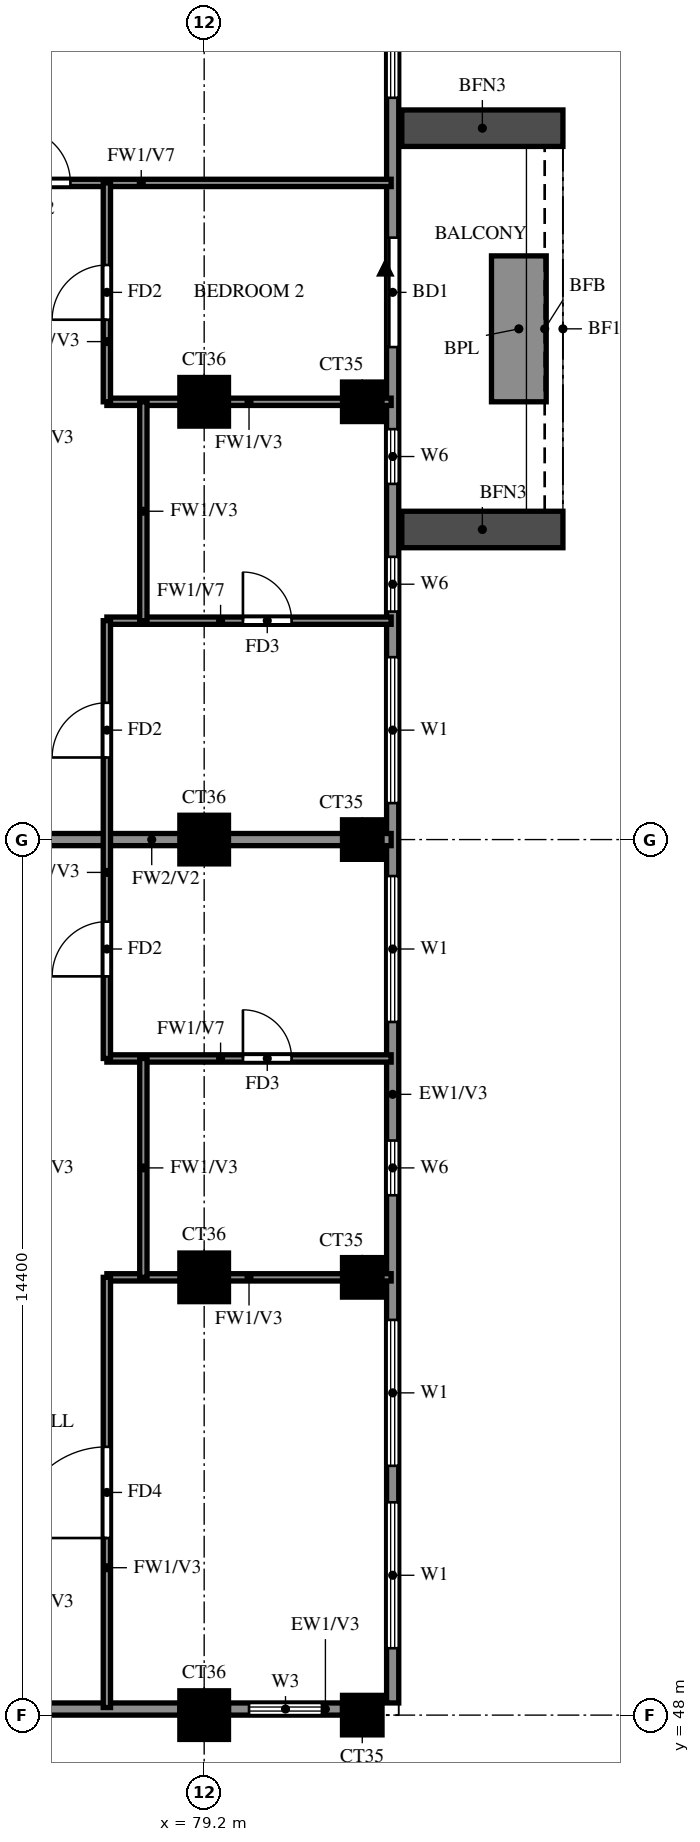
"""IFC4 building model, lengths in metres.
Left out: names, types, materials, properties, quantities, classifications, styles, units other than length and angle.
Written with IfcOpenShell. Run it as: python <this file> out.ifc"""

import sys

from ifc_helpers import new_model, si_unit, direction, frame, frame_2d, origin, origin_2d, place, context, subcontext, project, spatial, rectangle, extrude, source, transform, mapped, element, fill, save


model = new_model("IFC4")
c1 = context("Model", 3, precision=1e-05, world=origin(), true_north=direction((0.0, 1.0)))
c2 = subcontext(c1, "Body", "Model", "MODEL_VIEW")
j1 = project(units=[si_unit("LENGTHUNIT", "METRE"), si_unit("PLANEANGLEUNIT", "RADIAN")], contexts=[c1])
p1 = place(None, origin())
s1 = spatial("IfcSite", under=j1, at=p1, CompositionType="ELEMENT")
p2 = place(p1, origin())
s2 = spatial("IfcBuilding", under=s1, at=p2, CompositionType="ELEMENT")
p3 = place(p2, frame((0.0, 0.0, 236.0)))
s3 = spatial("IfcBuildingStorey", under=s2, at=p3, CompositionType="ELEMENT", Elevation=236.0)
m1 = source(origin(), c2, "Body", "SweptSolid", [
    extrude(rectangle(XDim=0.8, YDim=0.8, at=origin_2d()), origin(), (0.0, 0.0, 1.0), 3.22),
])
p4 = place(p3, frame((79.2, 48.0, 0.0), z_axis=(0.0, 0.0, 1.0), x_axis=(1.0, 0.0, 0.0)))
e1 = element("IfcColumn", 1, at=p4, inside=s3, PredefinedType="COLUMN", context=c2, shape_type="MappedRepresentation", body=[
    mapped(m1, transform((0.0, 0.0, 0.0))),
])
m2 = source(origin(), c2, "Body", "SweptSolid", [
    extrude(rectangle(XDim=0.65, YDim=0.65, at=origin_2d()), origin(), (0.0, 0.0, 1.0), 3.22),
])
p5 = place(p3, frame((81.8, 48.0, 0.0), z_axis=(0.0, 0.0, 1.0), x_axis=(1.0, 0.0, 0.0)))
e2 = element("IfcColumn", 2, at=p5, inside=s3, PredefinedType="COLUMN", context=c2, shape_type="MappedRepresentation", body=[
    mapped(m2, transform((0.0, 0.0, 0.0))),
])
p6 = place(p3, frame((79.2, 55.2, 0.0), z_axis=(0.0, 0.0, 1.0), x_axis=(1.0, 0.0, 0.0)))
e3 = element("IfcColumn", 3, at=p6, inside=s3, PredefinedType="COLUMN", context=c2, shape_type="MappedRepresentation", body=[
    mapped(m1, transform((0.0, 0.0, 0.0))),
])
p7 = place(p3, frame((81.8, 55.2, 0.0), z_axis=(0.0, 0.0, 1.0), x_axis=(1.0, 0.0, 0.0)))
e4 = element("IfcColumn", 4, at=p7, inside=s3, PredefinedType="COLUMN", context=c2, shape_type="MappedRepresentation", body=[
    mapped(m2, transform((0.0, 0.0, 0.0))),
])
p8 = place(p3, frame((79.2, 62.4, 0.0), z_axis=(0.0, 0.0, 1.0), x_axis=(1.0, 0.0, 0.0)))
e5 = element("IfcColumn", 5, at=p8, inside=s3, PredefinedType="COLUMN", context=c2, shape_type="MappedRepresentation", body=[
    mapped(m1, transform((0.0, 0.0, 0.0))),
])
p9 = place(p3, frame((81.8, 62.4, 0.0), z_axis=(0.0, 0.0, 1.0), x_axis=(1.0, 0.0, 0.0)))
e6 = element("IfcColumn", 6, at=p9, inside=s3, PredefinedType="COLUMN", context=c2, shape_type="MappedRepresentation", body=[
    mapped(m2, transform((0.0, 0.0, 0.0))),
])
p10 = place(p3, frame((79.2, 69.6, 0.0), z_axis=(0.0, 0.0, 1.0), x_axis=(1.0, 0.0, 0.0)))
e7 = element("IfcColumn", 7, at=p10, inside=s3, PredefinedType="COLUMN", context=c2, shape_type="MappedRepresentation", body=[
    mapped(m1, transform((0.0, 0.0, 0.0))),
])
p11 = place(p3, frame((81.8, 69.6, 0.0), z_axis=(0.0, 0.0, 1.0), x_axis=(1.0, 0.0, 0.0)))
e8 = element("IfcColumn", 8, at=p11, inside=s3, PredefinedType="COLUMN", context=c2, shape_type="MappedRepresentation", body=[
    mapped(m2, transform((0.0, 0.0, 0.0))),
])
p12 = place(p3, frame((81.907, 39.87, 0.0), z_axis=(0.0, 0.0, 1.0), x_axis=(-0.777936274417, 0.62834318087, 0.0)))
e9 = element("IfcWall", 9, at=p12, inside=s3, PredefinedType="SOLIDWALL", context=c2, shape_type="SweptSolid", body=[
    extrude(rectangle(XDim=13.099, YDim=0.2, at=frame_2d((6.549, 0.0))), origin(), (0.0, 0.0, 1.0), 3.22),
])
p13 = place(p12, frame((9.938, 0.0, 1.5)))
e10 = element("IfcOpeningElement", 10, at=p13, cuts=e9, PredefinedType="OPENING", context=c2, shape_type="SweptSolid", body=[
    extrude(rectangle(XDim=0.9, YDim=0.9, at=frame_2d((0.45, 0.45))), frame((0.0, 0.11, 0.0), z_axis=(0.0, -1.0, 0.0), x_axis=(1.0, 0.0, 0.0)), (0.0, 0.0, 1.0), 0.22),
])
p14 = place(p3, frame((71.987, 48.1, 0.0), z_axis=(0.0, 0.0, 1.0), x_axis=(1.0, 0.0, 0.0)))
e11 = element("IfcWall", 11, at=p14, inside=s3, PredefinedType="SOLIDWALL", context=c2, shape_type="SweptSolid", body=[
    extrude(rectangle(XDim=6.813, YDim=0.2, at=frame_2d((3.406, 0.0))), origin(), (0.0, 0.0, 1.0), 3.22),
])
p15 = place(p3, frame((79.6, 48.1, 0.0), z_axis=(0.0, 0.0, 1.0), x_axis=(1.0, 0.0, 0.0)))
e12 = element("IfcWall", 12, at=p15, inside=s3, PredefinedType="SOLIDWALL", context=c2, shape_type="SweptSolid", body=[
    extrude(rectangle(XDim=1.875, YDim=0.2, at=frame_2d((0.938, 0.0))), origin(), (0.0, 0.0, 1.0), 3.22),
])
p16 = place(p15, frame((0.337, 0.0, 0.6)))
e13 = element("IfcOpeningElement", 13, at=p16, cuts=e12, PredefinedType="OPENING", context=c2, shape_type="SweptSolid", body=[
    extrude(rectangle(XDim=1.2, YDim=2.4, at=frame_2d((0.6, 1.2))), frame((0.0, 0.11, 0.0), z_axis=(0.0, -1.0, 0.0), x_axis=(1.0, 0.0, 0.0)), (0.0, 0.0, 1.0), 0.22),
])
p17 = place(p3, frame((82.3, 48.2, 0.0), z_axis=(0.0, 0.0, 1.0), x_axis=(0.0, 1.0, 0.0)))
e14 = element("IfcWall", 14, at=p17, inside=s3, PredefinedType="SOLIDWALL", context=c2, shape_type="SweptSolid", body=[
    extrude(rectangle(XDim=28.6, YDim=0.2, at=frame_2d((14.3, 0.0))), origin(), (0.0, 0.0, 1.0), 3.22),
])
p18 = place(p17, frame((22.3, 0.0, 0.0)))
e15 = element("IfcOpeningElement", 15, at=p18, cuts=e14, PredefinedType="OPENING", context=c2, shape_type="SweptSolid", body=[
    extrude(rectangle(XDim=1.8, YDim=2.4, at=frame_2d((0.9, 1.2))), frame((0.0, 0.11, 0.0), z_axis=(0.0, -1.0, 0.0), x_axis=(1.0, 0.0, 0.0)), (0.0, 0.0, 1.0), 0.22),
])
p19 = place(p17, frame((0.9, 0.0, 0.6)))
e16 = element("IfcOpeningElement", 16, at=p19, cuts=e14, PredefinedType="OPENING", context=c2, shape_type="SweptSolid", body=[
    extrude(rectangle(XDim=2.4, YDim=2.4, at=frame_2d((1.2, 1.2))), frame((0.0, 0.11, 0.0), z_axis=(0.0, -1.0, 0.0), x_axis=(1.0, 0.0, 0.0)), (0.0, 0.0, 1.0), 0.22),
])
p20 = place(p17, frame((3.9, 0.0, 0.6)))
e17 = element("IfcOpeningElement", 17, at=p20, cuts=e14, PredefinedType="OPENING", context=c2, shape_type="SweptSolid", body=[
    extrude(rectangle(XDim=2.4, YDim=2.4, at=frame_2d((1.2, 1.2))), frame((0.0, 0.11, 0.0), z_axis=(0.0, -1.0, 0.0), x_axis=(1.0, 0.0, 0.0)), (0.0, 0.0, 1.0), 0.22),
])
p21 = place(p17, frame((11.2, 0.0, 0.6)))
e18 = element("IfcOpeningElement", 18, at=p21, cuts=e14, PredefinedType="OPENING", context=c2, shape_type="SweptSolid", body=[
    extrude(rectangle(XDim=2.4, YDim=2.4, at=frame_2d((1.2, 1.2))), frame((0.0, 0.11, 0.0), z_axis=(0.0, -1.0, 0.0), x_axis=(1.0, 0.0, 0.0)), (0.0, 0.0, 1.0), 0.22),
])
p22 = place(p17, frame((8.35, 0.0, 1.5)))
e19 = element("IfcOpeningElement", 19, at=p22, cuts=e14, PredefinedType="OPENING", context=c2, shape_type="SweptSolid", body=[
    extrude(rectangle(XDim=0.9, YDim=0.9, at=frame_2d((0.45, 0.45))), frame((0.0, 0.11, 0.0), z_axis=(0.0, -1.0, 0.0), x_axis=(1.0, 0.0, 0.0)), (0.0, 0.0, 1.0), 0.22),
])
p23 = place(p17, frame((14.8, 0.0, 0.6)))
e20 = element("IfcOpeningElement", 20, at=p23, cuts=e14, PredefinedType="OPENING", context=c2, shape_type="SweptSolid", body=[
    extrude(rectangle(XDim=2.4, YDim=2.4, at=frame_2d((1.2, 1.2))), frame((0.0, 0.11, 0.0), z_axis=(0.0, -1.0, 0.0), x_axis=(1.0, 0.0, 0.0)), (0.0, 0.0, 1.0), 0.22),
])
p24 = place(p17, frame((17.95, 0.0, 1.5)))
e21 = element("IfcOpeningElement", 21, at=p24, cuts=e14, PredefinedType="OPENING", context=c2, shape_type="SweptSolid", body=[
    extrude(rectangle(XDim=0.9, YDim=0.9, at=frame_2d((0.45, 0.45))), frame((0.0, 0.11, 0.0), z_axis=(0.0, -1.0, 0.0), x_axis=(1.0, 0.0, 0.0)), (0.0, 0.0, 1.0), 0.22),
])
p25 = place(p17, frame((20.05, 0.0, 1.5)))
e22 = element("IfcOpeningElement", 22, at=p25, cuts=e14, PredefinedType="OPENING", context=c2, shape_type="SweptSolid", body=[
    extrude(rectangle(XDim=0.9, YDim=0.9, at=frame_2d((0.45, 0.45))), frame((0.0, 0.11, 0.0), z_axis=(0.0, -1.0, 0.0), x_axis=(1.0, 0.0, 0.0)), (0.0, 0.0, 1.0), 0.22),
])
p26 = place(p17, frame((26.4, 0.0, 0.6)))
e23 = element("IfcOpeningElement", 23, at=p26, cuts=e14, PredefinedType="OPENING", context=c2, shape_type="SweptSolid", body=[
    extrude(rectangle(XDim=1.8, YDim=2.4, at=frame_2d((0.9, 1.2))), frame((0.0, 0.11, 0.0), z_axis=(0.0, -1.0, 0.0), x_axis=(1.0, 0.0, 0.0)), (0.0, 0.0, 1.0), 0.22),
])
for number, where, z_axis, x_axis in (
    (24, (82.45, 67.5, 0.0), (0.0, 0.0, 1.0), (1.0, 0.0, 0.0)),
    (25, (82.45, 74.1, 0.0), (0.0, 0.0, 1.0), (1.0, 0.0, 0.0)),
):
    element("IfcWall", number, at=place(p3, frame(where, z_axis=z_axis, x_axis=x_axis)), inside=s3, PredefinedType="SOLIDWALL", context=c2, shape_type="SweptSolid", body=[
        extrude(rectangle(XDim=2.65, YDim=0.6, at=frame_2d((1.325, 0.0))), origin(), (0.0, 0.0, 1.0), 2.85),
    ])
p27 = place(p3, frame((84.375, 69.6, 0.0), z_axis=(0.0, 0.0, 1.0), x_axis=(0.0, 1.0, 0.0)))
e26 = element("IfcWall", 26, at=p27, inside=s3, PredefinedType="SOLIDWALL", context=c2, shape_type="SweptSolid", body=[
    extrude(rectangle(XDim=2.4, YDim=0.9, at=frame_2d((1.2, 0.0))), origin(), (0.0, 0.0, 1.0), 0.9),
])
p28 = place(p3, frame((74.4, 62.4, 0.0), z_axis=(0.0, 0.0, 1.0), x_axis=(1.0, 0.0, 0.0)))
e27 = element("IfcWall", 27, at=p28, inside=s3, PredefinedType="SOLIDWALL", context=c2, shape_type="SweptSolid", body=[
    extrude(rectangle(XDim=7.875, YDim=0.2, at=frame_2d((3.938, 0.0))), origin(), (0.0, 0.0, 1.0), 3.22),
])
p29 = place(p3, frame((77.6, 55.2, 0.0), z_axis=(0.0, 0.0, 1.0), x_axis=(1.0, 0.0, 0.0)))
e28 = element("IfcWall", 28, at=p29, inside=s3, PredefinedType="PARTITIONING", context=c2, shape_type="SweptSolid", body=[
    extrude(rectangle(XDim=4.675, YDim=0.12, at=frame_2d((2.337, 0.0))), origin(), (0.0, 0.0, 1.0), 3.22),
])
p30 = place(p3, frame((77.6, 58.8, 0.0), z_axis=(0.0, 0.0, 1.0), x_axis=(1.0, 0.0, 0.0)))
e29 = element("IfcWall", 29, at=p30, inside=s3, PredefinedType="PARTITIONING", context=c2, shape_type="SweptSolid", body=[
    extrude(rectangle(XDim=4.675, YDim=0.12, at=frame_2d((2.337, 0.0))), origin(), (0.0, 0.0, 1.0), 2.32),
])
p31 = place(p30, frame((2.238, 0.0, 0.0)))
e30 = element("IfcOpeningElement", 30, at=p31, cuts=e29, PredefinedType="OPENING", context=c2, shape_type="SweptSolid", body=[
    extrude(rectangle(XDim=0.8, YDim=2.1, at=frame_2d((0.4, 1.05))), frame((0.0, 0.07, 0.0), z_axis=(0.0, -1.0, 0.0), x_axis=(1.0, 0.0, 0.0)), (0.0, 0.0, 1.0), 0.14),
])
p32 = place(p3, frame((77.6, 66.0, 0.0), z_axis=(0.0, 0.0, 1.0), x_axis=(1.0, 0.0, 0.0)))
e31 = element("IfcWall", 31, at=p32, inside=s3, PredefinedType="PARTITIONING", context=c2, shape_type="SweptSolid", body=[
    extrude(rectangle(XDim=4.675, YDim=0.12, at=frame_2d((2.337, 0.0))), origin(), (0.0, 0.0, 1.0), 2.32),
])
p33 = place(p32, frame((2.238, 0.0, 0.0)))
e32 = element("IfcOpeningElement", 32, at=p33, cuts=e31, PredefinedType="OPENING", context=c2, shape_type="SweptSolid", body=[
    extrude(rectangle(XDim=0.8, YDim=2.1, at=frame_2d((0.4, 1.05))), frame((0.0, 0.07, 0.0), z_axis=(0.0, -1.0, 0.0), x_axis=(1.0, 0.0, 0.0)), (0.0, 0.0, 1.0), 0.14),
])
p34 = place(p3, frame((77.6, 69.6, 0.0), z_axis=(0.0, 0.0, 1.0), x_axis=(1.0, 0.0, 0.0)))
e33 = element("IfcWall", 33, at=p34, inside=s3, PredefinedType="PARTITIONING", context=c2, shape_type="SweptSolid", body=[
    extrude(rectangle(XDim=4.675, YDim=0.12, at=frame_2d((2.337, 0.0))), origin(), (0.0, 0.0, 1.0), 3.22),
])
p35 = place(p3, frame((72.0, 73.2, 0.0), z_axis=(0.0, 0.0, 1.0), x_axis=(1.0, 0.0, 0.0)))
e34 = element("IfcWall", 34, at=p35, inside=s3, PredefinedType="PARTITIONING", context=c2, shape_type="SweptSolid", body=[
    extrude(rectangle(XDim=10.275, YDim=0.12, at=frame_2d((5.137, 0.0))), origin(), (0.0, 0.0, 1.0), 2.32),
])
p36 = place(p35, frame((4.1, 0.0, 0.0)))
e35 = element("IfcOpeningElement", 35, at=p36, cuts=e34, PredefinedType="OPENING", context=c2, shape_type="SweptSolid", body=[
    extrude(rectangle(XDim=0.9, YDim=2.1, at=frame_2d((0.45, 1.05))), frame((0.0, 0.07, 0.0), z_axis=(0.0, -1.0, 0.0), x_axis=(1.0, 0.0, 0.0)), (0.0, 0.0, 1.0), 0.14),
])
p37 = place(p3, frame((77.6, 48.125, 0.0), z_axis=(0.0, 0.0, 1.0), x_axis=(0.0, 1.0, 0.0)))
e36 = element("IfcWall", 36, at=p37, inside=s3, PredefinedType="PARTITIONING", context=c2, shape_type="SweptSolid", body=[
    extrude(rectangle(XDim=7.075, YDim=0.12, at=frame_2d((3.538, 0.0))), origin(), (0.0, 0.0, 1.0), 3.22),
])
p38 = place(p37, frame((2.788, 0.0, 0.0)))
e37 = element("IfcOpeningElement", 37, at=p38, cuts=e36, PredefinedType="OPENING", context=c2, shape_type="SweptSolid", body=[
    extrude(rectangle(XDim=1.5, YDim=2.1, at=frame_2d((0.75, 1.05))), frame((0.0, 0.07, 0.0), z_axis=(0.0, -1.0, 0.0), x_axis=(1.0, 0.0, 0.0)), (0.0, 0.0, 1.0), 0.14),
])
p39 = place(p3, frame((77.6, 58.8, 0.0), z_axis=(0.0, 0.0, 1.0), x_axis=(0.0, 1.0, 0.0)))
e38 = element("IfcWall", 38, at=p39, inside=s3, PredefinedType="PARTITIONING", context=c2, shape_type="SweptSolid", body=[
    extrude(rectangle(XDim=7.2, YDim=0.12, at=frame_2d((3.6, 0.0))), origin(), (0.0, 0.0, 1.0), 3.22),
])
p40 = place(p39, frame((1.35, 0.0, 0.0)))
e39 = element("IfcOpeningElement", 39, at=p40, cuts=e38, PredefinedType="OPENING", context=c2, shape_type="SweptSolid", body=[
    extrude(rectangle(XDim=0.9, YDim=2.1, at=frame_2d((0.45, 1.05))), frame((0.0, 0.07, 0.0), z_axis=(0.0, -1.0, 0.0), x_axis=(1.0, 0.0, 0.0)), (0.0, 0.0, 1.0), 0.14),
])
p41 = place(p39, frame((4.95, 0.0, 0.0)))
e40 = element("IfcOpeningElement", 40, at=p41, cuts=e38, PredefinedType="OPENING", context=c2, shape_type="SweptSolid", body=[
    extrude(rectangle(XDim=0.9, YDim=2.1, at=frame_2d((0.45, 1.05))), frame((0.0, 0.07, 0.0), z_axis=(0.0, -1.0, 0.0), x_axis=(1.0, 0.0, 0.0)), (0.0, 0.0, 1.0), 0.14),
])
p42 = place(p3, frame((77.6, 69.6, 0.0), z_axis=(0.0, 0.0, 1.0), x_axis=(0.0, 1.0, 0.0)))
e41 = element("IfcWall", 41, at=p42, inside=s3, PredefinedType="PARTITIONING", context=c2, shape_type="SweptSolid", body=[
    extrude(rectangle(XDim=3.6, YDim=0.12, at=frame_2d((1.8, 0.0))), origin(), (0.0, 0.0, 1.0), 3.22),
])
p43 = place(p42, frame((1.35, 0.0, 0.0)))
e42 = element("IfcOpeningElement", 42, at=p43, cuts=e41, PredefinedType="OPENING", context=c2, shape_type="SweptSolid", body=[
    extrude(rectangle(XDim=0.9, YDim=2.1, at=frame_2d((0.45, 1.05))), frame((0.0, 0.07, 0.0), z_axis=(0.0, -1.0, 0.0), x_axis=(1.0, 0.0, 0.0)), (0.0, 0.0, 1.0), 0.14),
])
for number, where, z_axis, x_axis in (
    (43, (78.2, 55.2, 0.0), (0.0, 0.0, 1.0), (0.0, 1.0, 0.0)),
    (44, (78.2, 66.0, 0.0), (0.0, 0.0, 1.0), (0.0, 1.0, 0.0)),
):
    element("IfcWall", number, at=place(p3, frame(where, z_axis=z_axis, x_axis=x_axis)), inside=s3, PredefinedType="PARTITIONING", context=c2, shape_type="SweptSolid", body=[
        extrude(rectangle(XDim=3.6, YDim=0.12, at=frame_2d((1.8, 0.0))), origin(), (0.0, 0.0, 1.0), 3.22),
    ])
p44 = place(p16, origin())
e45 = element("IfcWindow", 45, at=p44, inside=s3, PartitioningType="SINGLE_PANEL", PredefinedType="WINDOW", context=c2, shape_type="SweptSolid", body=[
    extrude(rectangle(XDim=1.2, YDim=2.4, at=frame_2d((0.6, 1.2))), frame((0.0, 0.03, 0.0), z_axis=(0.0, -1.0, 0.0), x_axis=(1.0, 0.0, 0.0)), (0.0, 0.0, 1.0), 0.06),
])
fill(e13, e45)
p45 = place(p18, origin())
e46 = element("IfcDoor", 46, at=p45, inside=s3, OperationType="DOUBLE_DOOR_SLIDING", PredefinedType="DOOR", context=c2, shape_type="SweptSolid", body=[
    extrude(rectangle(XDim=1.8, YDim=2.4, at=frame_2d((0.9, 1.2))), frame((0.0, 0.025, 0.0), z_axis=(0.0, -1.0, 0.0), x_axis=(1.0, 0.0, 0.0)), (0.0, 0.0, 1.0), 0.05),
])
fill(e15, e46)
p46 = place(p19, origin())
e47 = element("IfcWindow", 47, at=p46, inside=s3, PartitioningType="DOUBLE_PANEL_VERTICAL", PredefinedType="WINDOW", context=c2, shape_type="SweptSolid", body=[
    extrude(rectangle(XDim=2.4, YDim=2.4, at=frame_2d((1.2, 1.2))), frame((0.0, 0.03, 0.0), z_axis=(0.0, -1.0, 0.0), x_axis=(1.0, 0.0, 0.0)), (0.0, 0.0, 1.0), 0.06),
])
fill(e16, e47)
p47 = place(p20, origin())
e48 = element("IfcWindow", 48, at=p47, inside=s3, PartitioningType="DOUBLE_PANEL_VERTICAL", PredefinedType="WINDOW", context=c2, shape_type="SweptSolid", body=[
    extrude(rectangle(XDim=2.4, YDim=2.4, at=frame_2d((1.2, 1.2))), frame((0.0, 0.03, 0.0), z_axis=(0.0, -1.0, 0.0), x_axis=(1.0, 0.0, 0.0)), (0.0, 0.0, 1.0), 0.06),
])
fill(e17, e48)
p48 = place(p21, origin())
e49 = element("IfcWindow", 49, at=p48, inside=s3, PartitioningType="DOUBLE_PANEL_VERTICAL", PredefinedType="WINDOW", context=c2, shape_type="SweptSolid", body=[
    extrude(rectangle(XDim=2.4, YDim=2.4, at=frame_2d((1.2, 1.2))), frame((0.0, 0.03, 0.0), z_axis=(0.0, -1.0, 0.0), x_axis=(1.0, 0.0, 0.0)), (0.0, 0.0, 1.0), 0.06),
])
fill(e18, e49)
p49 = place(p22, origin())
e50 = element("IfcWindow", 50, at=p49, inside=s3, PartitioningType="SINGLE_PANEL", PredefinedType="WINDOW", context=c2, shape_type="SweptSolid", body=[
    extrude(rectangle(XDim=0.9, YDim=0.9, at=frame_2d((0.45, 0.45))), frame((0.0, 0.03, 0.0), z_axis=(0.0, -1.0, 0.0), x_axis=(1.0, 0.0, 0.0)), (0.0, 0.0, 1.0), 0.06),
])
fill(e19, e50)
p50 = place(p23, origin())
e51 = element("IfcWindow", 51, at=p50, inside=s3, PartitioningType="DOUBLE_PANEL_VERTICAL", PredefinedType="WINDOW", context=c2, shape_type="SweptSolid", body=[
    extrude(rectangle(XDim=2.4, YDim=2.4, at=frame_2d((1.2, 1.2))), frame((0.0, 0.03, 0.0), z_axis=(0.0, -1.0, 0.0), x_axis=(1.0, 0.0, 0.0)), (0.0, 0.0, 1.0), 0.06),
])
fill(e20, e51)
p51 = place(p24, origin())
e52 = element("IfcWindow", 52, at=p51, inside=s3, PartitioningType="SINGLE_PANEL", PredefinedType="WINDOW", context=c2, shape_type="SweptSolid", body=[
    extrude(rectangle(XDim=0.9, YDim=0.9, at=frame_2d((0.45, 0.45))), frame((0.0, 0.03, 0.0), z_axis=(0.0, -1.0, 0.0), x_axis=(1.0, 0.0, 0.0)), (0.0, 0.0, 1.0), 0.06),
])
fill(e21, e52)
p52 = place(p25, origin())
e53 = element("IfcWindow", 53, at=p52, inside=s3, PartitioningType="SINGLE_PANEL", PredefinedType="WINDOW", context=c2, shape_type="SweptSolid", body=[
    extrude(rectangle(XDim=0.9, YDim=0.9, at=frame_2d((0.45, 0.45))), frame((0.0, 0.03, 0.0), z_axis=(0.0, -1.0, 0.0), x_axis=(1.0, 0.0, 0.0)), (0.0, 0.0, 1.0), 0.06),
])
fill(e22, e53)
p53 = place(p26, origin())
e54 = element("IfcWindow", 54, at=p53, inside=s3, PartitioningType="DOUBLE_PANEL_VERTICAL", PredefinedType="WINDOW", context=c2, shape_type="SweptSolid", body=[
    extrude(rectangle(XDim=1.8, YDim=2.4, at=frame_2d((0.9, 1.2))), frame((0.0, 0.03, 0.0), z_axis=(0.0, -1.0, 0.0), x_axis=(1.0, 0.0, 0.0)), (0.0, 0.0, 1.0), 0.06),
])
fill(e23, e54)
p54 = place(p38, origin())
e55 = element("IfcDoor", 55, at=p54, inside=s3, OperationType="SINGLE_SWING_LEFT", PredefinedType="DOOR", context=c2, shape_type="SweptSolid", body=[
    extrude(rectangle(XDim=1.5, YDim=2.1, at=frame_2d((0.75, 1.05))), frame((0.0, 0.025, 0.0), z_axis=(0.0, -1.0, 0.0), x_axis=(1.0, 0.0, 0.0)), (0.0, 0.0, 1.0), 0.05),
])
fill(e37, e55)
p55 = place(p40, origin())
e56 = element("IfcDoor", 56, at=p55, inside=s3, OperationType="SINGLE_SWING_RIGHT", PredefinedType="DOOR", context=c2, shape_type="SweptSolid", body=[
    extrude(rectangle(XDim=0.9, YDim=2.1, at=frame_2d((0.45, 1.05))), frame((0.0, 0.025, 0.0), z_axis=(0.0, -1.0, 0.0), x_axis=(1.0, 0.0, 0.0)), (0.0, 0.0, 1.0), 0.05),
])
fill(e39, e56)
p56 = place(p31, origin())
e57 = element("IfcDoor", 57, at=p56, inside=s3, OperationType="SINGLE_SWING_LEFT", PredefinedType="DOOR", context=c2, shape_type="SweptSolid", body=[
    extrude(rectangle(XDim=0.8, YDim=2.1, at=frame_2d((0.4, 1.05))), frame((0.0, 0.025, 0.0), z_axis=(0.0, -1.0, 0.0), x_axis=(1.0, 0.0, 0.0)), (0.0, 0.0, 1.0), 0.05),
])
fill(e30, e57)
p57 = place(p41, origin())
e58 = element("IfcDoor", 58, at=p57, inside=s3, OperationType="SINGLE_SWING_LEFT", PredefinedType="DOOR", context=c2, shape_type="SweptSolid", body=[
    extrude(rectangle(XDim=0.9, YDim=2.1, at=frame_2d((0.45, 1.05))), frame((0.0, 0.025, 0.0), z_axis=(0.0, -1.0, 0.0), x_axis=(1.0, 0.0, 0.0)), (0.0, 0.0, 1.0), 0.05),
])
fill(e40, e58)
p58 = place(p33, origin())
e59 = element("IfcDoor", 59, at=p58, inside=s3, OperationType="SINGLE_SWING_LEFT", PredefinedType="DOOR", context=c2, shape_type="SweptSolid", body=[
    extrude(rectangle(XDim=0.8, YDim=2.1, at=frame_2d((0.4, 1.05))), frame((0.0, 0.025, 0.0), z_axis=(0.0, -1.0, 0.0), x_axis=(1.0, 0.0, 0.0)), (0.0, 0.0, 1.0), 0.05),
])
fill(e32, e59)
p59 = place(p43, origin())
e60 = element("IfcDoor", 60, at=p59, inside=s3, OperationType="SINGLE_SWING_RIGHT", PredefinedType="DOOR", context=c2, shape_type="SweptSolid", body=[
    extrude(rectangle(XDim=0.9, YDim=2.1, at=frame_2d((0.45, 1.05))), frame((0.0, 0.025, 0.0), z_axis=(0.0, -1.0, 0.0), x_axis=(1.0, 0.0, 0.0)), (0.0, 0.0, 1.0), 0.05),
])
fill(e42, e60)
p60 = place(p36, origin())
e61 = element("IfcDoor", 61, at=p60, inside=s3, OperationType="SINGLE_SWING_LEFT", PredefinedType="DOOR", context=c2, shape_type="SweptSolid", body=[
    extrude(rectangle(XDim=0.9, YDim=2.1, at=frame_2d((0.45, 1.05))), frame((0.0, 0.025, 0.0), z_axis=(0.0, -1.0, 0.0), x_axis=(1.0, 0.0, 0.0)), (0.0, 0.0, 1.0), 0.05),
])
fill(e35, e61)
save(model, sys.argv[1])
